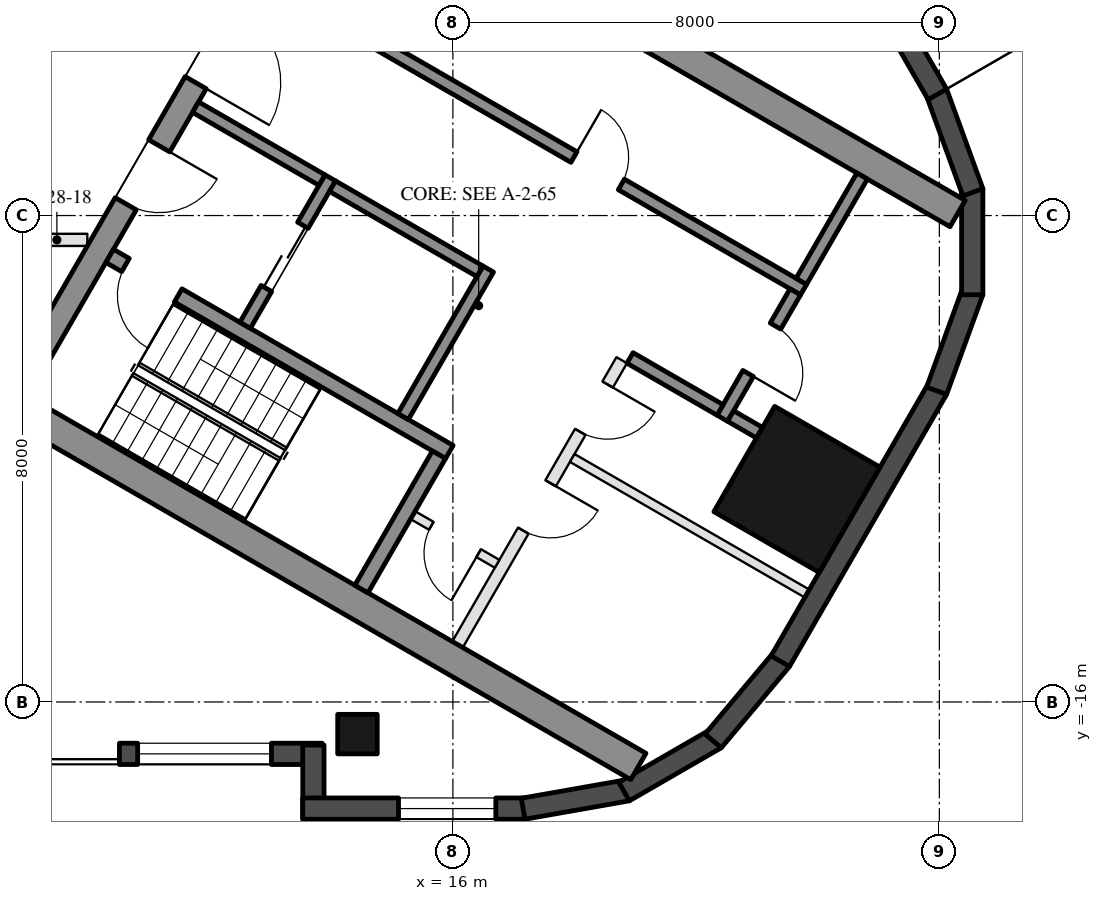
"""IFC4 building model, lengths in metres.
Left out: names, types, materials, properties, quantities, classifications, styles, units other than length and angle.
Written with IfcOpenShell. Run it as: python <this file> out.ifc"""

import sys

from ifc_helpers import new_model, si_unit, direction, frame, frame_2d, origin, origin_2d, place, context, subcontext, project, spatial, rectangle, hollow_rectangle, extrude, boolean, halfspace, element, fill, save


model = new_model("IFC4")
c1 = context("Model", 3, precision=1e-05, world=origin(), true_north=direction((0.0, 1.0)))
c2 = subcontext(c1, "Body", "Model", "MODEL_VIEW")
j1 = project(units=[si_unit("LENGTHUNIT", "METRE"), si_unit("PLANEANGLEUNIT", "RADIAN")], contexts=[c1])
p1 = place(None, origin())
s1 = spatial("IfcSite", under=j1, at=p1, CompositionType="ELEMENT")
p2 = place(p1, origin())
s2 = spatial("IfcBuilding", under=s1, at=p2, CompositionType="ELEMENT")
p3 = place(p2, frame((0.0, 0.0, 280.0)))
s3 = spatial("IfcBuildingStorey", under=s2, at=p3, CompositionType="ELEMENT", Elevation=280.0)
p4 = place(p3, frame((14.431, -16.529, 0.0), z_axis=(0.0, 0.0, 1.0), x_axis=(-1.0, 0.0, 0.0)))
e1 = element("IfcColumn", 1, at=p4, inside=s3, PredefinedType="COLUMN", context=c2, shape_type="SweptSolid", body=[
    boolean("DIFFERENCE", extrude(hollow_rectangle(XDim=0.65, YDim=0.65, WallThickness=0.03, at=origin_2d()), origin(), (0.0, 0.0, 1.0), 3.7), halfspace(frame((0.0, 0.0, 0.047), z_axis=(0.0, 0.0, 1.0), x_axis=(1.0, 0.0, 0.0)), True)),
])
p5 = place(p3, frame((21.658, -12.504, 0.0), z_axis=(0.0, 0.0, 1.0), x_axis=(0.5, 0.866025403784, 0.0)))
e2 = element("IfcColumn", 2, at=p5, inside=s3, PredefinedType="COLUMN", context=c2, shape_type="SweptSolid", body=[
    boolean("DIFFERENCE", extrude(hollow_rectangle(XDim=2.0, YDim=2.0, WallThickness=0.05, at=origin_2d()), origin(), (0.0, 0.0, 1.0), 3.7), halfspace(frame((0.0, 0.0, 0.113), z_axis=(0.0, 0.0, 1.0), x_axis=(1.0, 0.0, 0.0)), True)),
])
p6 = place(p3, frame((7.795, -16.854, 0.0), z_axis=(0.0, 0.0, 1.0), x_axis=(1.0, 0.0, 0.0)))
e3 = element("IfcWall", 3, at=p6, inside=s3, PredefinedType="SOLIDWALL", context=c2, shape_type="SweptSolid", body=[
    extrude(rectangle(XDim=6.055, YDim=0.35, at=frame_2d((3.028, 0.0))), origin(), (0.0, 0.0, 1.0), 3.55),
])
p7 = place(p6, frame((0.32, 0.0, 0.0)))
e4 = element("IfcOpeningElement", 4, at=p7, cuts=e3, PredefinedType="OPENING", context=c2, shape_type="SweptSolid", body=[
    extrude(rectangle(XDim=2.4, YDim=2.4, at=frame_2d((1.2, 1.2))), frame((0.0, 0.185, 0.0), z_axis=(0.0, -1.0, 0.0), x_axis=(1.0, 0.0, 0.0)), (0.0, 0.0, 1.0), 0.37),
])
p8 = place(p6, frame((3.02, 0.0, 0.3)))
e5 = element("IfcOpeningElement", 5, at=p8, cuts=e3, PredefinedType="OPENING", context=c2, shape_type="SweptSolid", body=[
    extrude(rectangle(XDim=2.2, YDim=2.65, at=frame_2d((1.1, 1.325))), frame((0.0, 0.185, 0.0), z_axis=(0.0, -1.0, 0.0), x_axis=(1.0, 0.0, 0.0)), (0.0, 0.0, 1.0), 0.37),
])
p9 = place(p3, frame((13.706, -16.709, 0.0), z_axis=(0.0, 0.0, 1.0), x_axis=(0.0, -1.0, 0.0)))
e6 = element("IfcWall", 6, at=p9, inside=s3, PredefinedType="SOLIDWALL", context=c2, shape_type="SweptSolid", body=[
    extrude(rectangle(XDim=1.22, YDim=0.35, at=frame_2d((0.61, 0.0))), origin(), (0.0, 0.0, 1.0), 3.55),
])
p10 = place(p3, frame((13.531, -17.754, 0.0), z_axis=(0.0, 0.0, 1.0), x_axis=(1.0, 0.0, 0.0)))
e7 = element("IfcWall", 7, at=p10, inside=s3, PredefinedType="SOLIDWALL", context=c2, shape_type="SweptSolid", body=[
    extrude(rectangle(XDim=3.654, YDim=0.35, at=frame_2d((1.827, 0.0))), origin(), (0.0, 0.0, 1.0), 3.55),
])
p11 = place(p10, frame((1.575, 0.0, 0.3)))
e8 = element("IfcOpeningElement", 8, at=p11, cuts=e7, PredefinedType="OPENING", context=c2, shape_type="SweptSolid", body=[
    extrude(rectangle(XDim=1.6, YDim=2.65, at=frame_2d((0.8, 1.325))), frame((0.0, 0.185, 0.0), z_axis=(0.0, -1.0, 0.0), x_axis=(1.0, 0.0, 0.0)), (0.0, 0.0, 1.0), 0.37),
])
for number, where, z_axis, x_axis in (
    (9, (17.155, -17.756, 0.0), (0.0, 0.0, 1.0), (0.985, 0.174, 0.0)),
    (10, (18.816, -17.474, 0.0), (0.0, 0.0, 1.0), (0.866, 0.5, 0.0)),
    (11, (20.28, -16.641, 0.0), (0.0, 0.0, 1.0), (0.643, 0.766, 0.0)),
):
    element("IfcWall", number, at=place(p3, frame(where, z_axis=z_axis, x_axis=x_axis)), inside=s3, PredefinedType="SOLIDWALL", context=c2, shape_type="SweptSolid", body=[
        extrude(rectangle(XDim=1.745, YDim=0.35, at=frame_2d((0.872, 0.0))), origin(), (0.0, 0.0, 1.0), 3.55),
    ])
p12 = place(p3, frame((21.384, -15.33, 0.0), z_axis=(0.0, 0.0, 1.0), x_axis=(0.500020983425, 0.866013288659, 0.0)))
e12 = element("IfcWall", 12, at=p12, inside=s3, PredefinedType="SOLIDWALL", context=c2, shape_type="SweptSolid", body=[
    extrude(rectangle(XDim=5.168, YDim=0.35, at=frame_2d((2.584, 0.0))), origin(), (0.0, 0.0, 1.0), 3.55),
])
for number, where, z_axis, x_axis in (
    (13, (23.955, -10.882, 0.0), (0.0, 0.0, 1.0), (0.342, 0.94, 0.0)),
    (14, (24.541, -9.302, 0.0), (0.0, 0.0, 1.0), (0.0, 1.0, 0.0)),
    (15, (24.552, -7.618, 0.0), (0.0, 0.0, 1.0), (-0.342, 0.94, 0.0)),
):
    element("IfcWall", number, at=place(p3, frame(where, z_axis=z_axis, x_axis=x_axis)), inside=s3, PredefinedType="SOLIDWALL", context=c2, shape_type="SweptSolid", body=[
        extrude(rectangle(XDim=1.745, YDim=0.35, at=frame_2d((0.872, 0.0))), origin(), (0.0, 0.0, 1.0), 3.55),
    ])
p13 = place(p3, frame((23.968, -6.006, 0.0), z_axis=(0.0, 0.0, 1.0), x_axis=(-0.500008899612, 0.86602026553, 0.0)))
e16 = element("IfcWall", 16, at=p13, inside=s3, PredefinedType="SOLIDWALL", context=c2, shape_type="SweptSolid", body=[
    extrude(rectangle(XDim=10.87, YDim=0.35, at=frame_2d((5.435, 0.0))), origin(), (0.0, 0.0, 1.0), 3.55),
])
p14 = place(p13, frame((6.894, 0.0, 0.0)))
e17 = element("IfcOpeningElement", 17, at=p14, cuts=e16, PredefinedType="OPENING", context=c2, shape_type="SweptSolid", body=[
    extrude(rectangle(XDim=2.4, YDim=2.4, at=frame_2d((1.2, 1.2))), frame((0.0, 0.185, 0.0), z_axis=(0.0, -1.0, 0.0), x_axis=(1.0, 0.0, 0.0)), (0.0, 0.0, 1.0), 0.37),
])
p15 = place(p13, frame((3.429, 0.0, 0.3)))
e18 = element("IfcOpeningElement", 18, at=p15, cuts=e16, PredefinedType="OPENING", context=c2, shape_type="SweptSolid", body=[
    extrude(rectangle(XDim=3.1, YDim=2.65, at=frame_2d((1.55, 1.325))), frame((0.0, 0.185, 0.0), z_axis=(0.0, -1.0, 0.0), x_axis=(1.0, 0.0, 0.0)), (0.0, 0.0, 1.0), 0.37),
])
for number, where, z_axis, x_axis in (
    (19, (8.547, -10.997, 0.0), (0.0, 0.0, 1.0), (0.866, -0.5, 0.0)),
    (20, (13.797, -1.903, 0.0), (0.0, 0.0, 1.0), (0.866, -0.5, 0.0)),
):
    element("IfcWall", number, at=place(p3, frame(where, z_axis=z_axis, x_axis=x_axis)), inside=s3, PredefinedType="SHEAR", context=c2, shape_type="SweptSolid", body=[
        extrude(rectangle(XDim=12.129, YDim=0.5, at=frame_2d((6.064, 0.0))), origin(), (0.0, 0.0, 1.0), 3.5),
    ])
p16 = place(p3, frame((8.845, -10.88, 0.0), z_axis=(0.0, 0.0, 1.0), x_axis=(0.500004234368, 0.866022959057, 0.0)))
e21 = element("IfcWall", 21, at=p16, inside=s3, PredefinedType="SHEAR", context=c2, shape_type="SweptSolid", body=[
    extrude(rectangle(XDim=10.0, YDim=0.4, at=frame_2d((5.0, 0.0))), origin(), (0.0, 0.0, 1.0), 3.5),
])
p17 = place(p16, frame((3.55, 0.0, 0.0)))
e22 = element("IfcOpeningElement", 22, at=p17, cuts=e21, PredefinedType="OPENING", context=c2, shape_type="SweptSolid", body=[
    extrude(rectangle(XDim=1.1, YDim=2.1, at=frame_2d((0.55, 1.05))), frame((0.0, 0.21, 0.0), z_axis=(0.0, -1.0, 0.0), x_axis=(1.0, 0.0, 0.0)), (0.0, 0.0, 1.0), 0.42),
])
p18 = place(p16, frame((5.85, 0.0, 0.0)))
e23 = element("IfcOpeningElement", 23, at=p18, cuts=e21, PredefinedType="OPENING", context=c2, shape_type="SweptSolid", body=[
    extrude(rectangle(XDim=1.4, YDim=2.1, at=frame_2d((0.7, 1.05))), frame((0.0, 0.21, 0.0), z_axis=(0.0, -1.0, 0.0), x_axis=(1.0, 0.0, 0.0)), (0.0, 0.0, 1.0), 0.42),
])
p19 = place(p3, frame((10.356, -8.664, 0.0), z_axis=(0.0, 0.0, 1.0), x_axis=(0.866028629588, -0.499994412703, 0.0)))
e24 = element("IfcWall", 24, at=p19, inside=s3, PredefinedType="SHEAR", context=c2, shape_type="SweptSolid", body=[
    extrude(rectangle(XDim=6.45, YDim=0.25, at=frame_2d((3.225, 0.0))), origin(), (0.0, 0.0, 1.0), 3.5),
])
p20 = place(p19, frame((0.3, 0.0, 0.0)))
e25 = element("IfcOpeningElement", 25, at=p20, cuts=e24, PredefinedType="OPENING", context=c2, shape_type="SweptSolid", body=[
    extrude(rectangle(XDim=1.0, YDim=2.1, at=frame_2d((0.5, 1.05))), frame((0.0, 0.135, 0.0), z_axis=(0.0, -1.0, 0.0), x_axis=(1.0, 0.0, 0.0)), (0.0, 0.0, 1.0), 0.27),
])
p21 = place(p3, frame((14.496, -14.143, 0.0), z_axis=(0.0, 0.0, 1.0), x_axis=(0.500062241894, 0.865989465428, 0.0)))
e26 = element("IfcWall", 26, at=p21, inside=s3, PredefinedType="SHEAR", context=c2, shape_type="SweptSolid", body=[
    extrude(rectangle(XDim=2.55, YDim=0.25, at=frame_2d((1.275, 0.0))), origin(), (0.0, 0.0, 1.0), 3.5),
])
p22 = place(p3, frame((15.181, -11.305, 0.0), z_axis=(0.0, 0.0, 1.0), x_axis=(0.49994636267, 0.866056369097, 0.0)))
e27 = element("IfcWall", 27, at=p22, inside=s3, PredefinedType="SHEAR", context=c2, shape_type="SweptSolid", body=[
    extrude(rectangle(XDim=2.8, YDim=0.2, at=frame_2d((1.4, 0.0))), origin(), (0.0, 0.0, 1.0), 3.5),
])
p23 = place(p3, frame((12.583, -9.805, 0.0), z_axis=(0.0, 0.0, 1.0), x_axis=(0.49994636267, 0.866056369097, 0.0)))
e28 = element("IfcWall", 28, at=p23, inside=s3, PredefinedType="SHEAR", context=c2, shape_type="SweptSolid", body=[
    extrude(rectangle(XDim=2.8, YDim=0.2, at=frame_2d((1.4, 0.0))), origin(), (0.0, 0.0, 1.0), 3.5),
])
p24 = place(p23, frame((0.7, 0.0, 0.0)))
e29 = element("IfcOpeningElement", 29, at=p24, cuts=e28, PredefinedType="OPENING", context=c2, shape_type="SweptSolid", body=[
    extrude(rectangle(XDim=1.2, YDim=2.1, at=frame_2d((0.6, 1.05))), frame((0.0, 0.11, 0.0), z_axis=(0.0, -1.0, 0.0), x_axis=(1.0, 0.0, 0.0)), (0.0, 0.0, 1.0), 0.22),
])
p25 = place(p3, frame((11.768, -6.217, 0.0), z_axis=(0.0, 0.0, 1.0), x_axis=(0.866050077142, -0.499957262057, 0.0)))
e30 = element("IfcWall", 30, at=p25, inside=s3, PredefinedType="SHEAR", context=c2, shape_type="SweptSolid", body=[
    extrude(rectangle(XDim=2.4, YDim=0.2, at=frame_2d((1.2, 0.0))), origin(), (0.0, 0.0, 1.0), 3.5),
])
p26 = place(p3, frame((14.02, -7.517, 0.0), z_axis=(0.0, 0.0, 1.0), x_axis=(0.866034573852, -0.49998411664, 0.0)))
e31 = element("IfcWall", 31, at=p26, inside=s3, PredefinedType="SHEAR", context=c2, shape_type="SweptSolid", body=[
    extrude(rectangle(XDim=2.8, YDim=0.2, at=frame_2d((1.4, 0.0))), origin(), (0.0, 0.0, 1.0), 3.5),
])
p27 = place(p3, frame((12.968, -4.138, 0.0), z_axis=(0.0, 0.0, 1.0), x_axis=(0.866028328073, -0.49999493495, 0.0)))
e32 = element("IfcWall", 32, at=p27, inside=s3, PredefinedType="SHEAR", context=c2, shape_type="SweptSolid", body=[
    extrude(rectangle(XDim=10.16, YDim=0.2, at=frame_2d((5.08, 0.0))), origin(), (0.0, 0.0, 1.0), 3.5),
])
p28 = place(p27, frame((0.62, 0.0, 0.0)))
e33 = element("IfcOpeningElement", 33, at=p28, cuts=e32, PredefinedType="OPENING", context=c2, shape_type="SweptSolid", body=[
    extrude(rectangle(XDim=1.1, YDim=2.1, at=frame_2d((0.55, 1.05))), frame((0.0, 0.11, 0.0), z_axis=(0.0, -1.0, 0.0), x_axis=(1.0, 0.0, 0.0)), (0.0, 0.0, 1.0), 0.22),
])
p29 = place(p27, frame((5.8, 0.0, 0.0)))
e34 = element("IfcOpeningElement", 34, at=p29, cuts=e32, PredefinedType="OPENING", context=c2, shape_type="SweptSolid", body=[
    extrude(rectangle(XDim=0.9, YDim=2.1, at=frame_2d((0.45, 1.05))), frame((0.0, 0.11, 0.0), z_axis=(0.0, -1.0, 0.0), x_axis=(1.0, 0.0, 0.0)), (0.0, 0.0, 1.0), 0.22),
])
p30 = place(p3, frame((20.43, -11.333, 0.0), z_axis=(0.0, 0.0, 1.0), x_axis=(0.500001309137, 0.866024647952, 0.0)))
e35 = element("IfcWall", 35, at=p30, inside=s3, PredefinedType="SHEAR", context=c2, shape_type="SweptSolid", body=[
    extrude(rectangle(XDim=2.4, YDim=0.2, at=frame_2d((1.2, 0.0))), origin(), (0.0, 0.0, 1.0), 3.5),
])
p31 = place(p30, frame((0.85, 0.0, 0.0)))
e36 = element("IfcOpeningElement", 36, at=p31, cuts=e35, PredefinedType="OPENING", context=c2, shape_type="SweptSolid", body=[
    extrude(rectangle(XDim=0.9, YDim=2.1, at=frame_2d((0.45, 1.05))), frame((0.0, 0.11, 0.0), z_axis=(0.0, -1.0, 0.0), x_axis=(1.0, 0.0, 0.0)), (0.0, 0.0, 1.0), 0.22),
])
p32 = place(p3, frame((18.913, -10.342, 0.0), z_axis=(0.0, 0.0, 1.0), x_axis=(0.866038183914, -0.499977863513, 0.0)))
e37 = element("IfcWall", 37, at=p32, inside=s3, PredefinedType="SHEAR", context=c2, shape_type="SweptSolid", body=[
    extrude(rectangle(XDim=1.71, YDim=0.2, at=frame_2d((0.855, 0.0))), origin(), (0.0, 0.0, 1.0), 3.5),
])
for number, where, z_axis, x_axis in (
    (38, (15.131, -5.272, 0.0), (0.0, 0.0, 1.0), (0.5, 0.866, 0.0)),
    (39, (21.73, -9.082, 0.0), (0.0, 0.0, 1.0), (0.5, 0.866, 0.0)),
):
    element("IfcWall", number, at=place(p3, frame(where, z_axis=z_axis, x_axis=x_axis)), inside=s3, PredefinedType="SHEAR", context=c2, shape_type="SweptSolid", body=[
        extrude(rectangle(XDim=2.0, YDim=0.2, at=frame_2d((1.0, 0.0))), origin(), (0.0, 0.0, 1.0), 3.5),
    ])
p33 = place(p3, frame((20.567, -11.297, 0.0), z_axis=(0.0, 0.0, 1.0), x_axis=(0.866237429803, -0.49963258021, 0.0)))
e40 = element("IfcWall", 40, at=p33, inside=s3, PredefinedType="SHEAR", context=c2, shape_type="SweptSolid", body=[
    extrude(rectangle(XDim=0.549, YDim=0.2, at=frame_2d((0.274, 0.0))), origin(), (0.0, 0.0, 1.0), 3.5),
])
p34 = place(p3, frame((16.076, -15.055, 0.0), z_axis=(0.0, 0.0, 1.0), x_axis=(0.499995103361, 0.866028230842, 0.0)))
e41 = element("IfcWall", 41, at=p34, inside=s3, PredefinedType="PARTITIONING", context=c2, shape_type="SweptSolid", body=[
    extrude(rectangle(XDim=5.4, YDim=0.2, at=frame_2d((2.7, 0.0))), origin(), (0.0, 0.0, 1.0), 3.5),
])
p35 = place(p34, frame((2.163, 0.0, 0.0)))
e42 = element("IfcOpeningElement", 42, at=p35, cuts=e41, PredefinedType="OPENING", context=c2, shape_type="SweptSolid", body=[
    extrude(rectangle(XDim=0.9, YDim=2.1, at=frame_2d((0.45, 1.05))), frame((0.0, 0.11, 0.0), z_axis=(0.0, -1.0, 0.0), x_axis=(1.0, 0.0, 0.0)), (0.0, 0.0, 1.0), 0.22),
])
p36 = place(p34, frame((4.038, 0.0, 0.0)))
e43 = element("IfcOpeningElement", 43, at=p36, cuts=e41, PredefinedType="OPENING", context=c2, shape_type="SweptSolid", body=[
    extrude(rectangle(XDim=0.9, YDim=2.1, at=frame_2d((0.45, 1.05))), frame((0.0, 0.11, 0.0), z_axis=(0.0, -1.0, 0.0), x_axis=(1.0, 0.0, 0.0)), (0.0, 0.0, 1.0), 0.22),
])
p37 = place(p3, frame((15.342, -12.928, 0.0), z_axis=(0.0, 0.0, 1.0), x_axis=(0.865989903783, -0.500061482766, 0.0)))
e44 = element("IfcWall", 44, at=p37, inside=s3, PredefinedType="PARTITIONING", context=c2, shape_type="SweptSolid", body=[
    extrude(rectangle(XDim=1.6, YDim=0.15, at=frame_2d((0.8, 0.0))), origin(), (0.0, 0.0, 1.0), 3.5),
])
p38 = place(p37, frame((0.35, 0.0, 0.0)))
e45 = element("IfcOpeningElement", 45, at=p38, cuts=e44, PredefinedType="OPENING", context=c2, shape_type="SweptSolid", body=[
    extrude(rectangle(XDim=0.9, YDim=2.1, at=frame_2d((0.45, 1.05))), frame((0.0, 0.085, 0.0), z_axis=(0.0, -1.0, 0.0), x_axis=(1.0, 0.0, 0.0)), (0.0, 0.0, 1.0), 0.17),
])
p39 = place(p3, frame((17.963, -11.987, 0.0), z_axis=(0.0, 0.0, 1.0), x_axis=(0.866010510293, -0.500025795397, 0.0)))
e46 = element("IfcWall", 46, at=p39, inside=s3, PredefinedType="PARTITIONING", context=c2, shape_type="SweptSolid", body=[
    extrude(rectangle(XDim=4.459, YDim=0.15, at=frame_2d((2.229, 0.0))), origin(), (0.0, 0.0, 1.0), 3.5),
])
p40 = place(p3, frame((9.988, -8.4, 0.0), z_axis=(0.0, 0.0, 1.0), x_axis=(-1.0, 0.0, 0.0)))
e47 = element("IfcWall", 47, at=p40, inside=s3, PredefinedType="PARTITIONING", context=c2, shape_type="SweptSolid", body=[
    extrude(rectangle(XDim=4.175, YDim=0.2, at=frame_2d((2.087, 0.0))), origin(), (0.0, 0.0, 1.0), 3.05),
])
p41 = place(p40, frame((1.587, 0.0, 0.0)))
e48 = element("IfcOpeningElement", 48, at=p41, cuts=e47, PredefinedType="OPENING", context=c2, shape_type="SweptSolid", body=[
    extrude(rectangle(XDim=1.0, YDim=2.1, at=frame_2d((0.5, 1.05))), frame((0.0, 0.11, 0.0), z_axis=(0.0, -1.0, 0.0), x_axis=(1.0, 0.0, 0.0)), (0.0, 0.0, 1.0), 0.22),
])
p42 = place(p7, frame((2.4, 0.0, 0.0), z_axis=(0.0, 0.0, 1.0), x_axis=(-1.0, 0.0, 0.0)))
e49 = element("IfcDoor", 49, at=p42, inside=s3, OperationType="SLIDING_TO_LEFT", PredefinedType="DOOR", context=c2, shape_type="SweptSolid", body=[
    extrude(rectangle(XDim=2.4, YDim=2.4, at=frame_2d((1.2, 1.2))), frame((0.0, 0.025, 0.0), z_axis=(0.0, -1.0, 0.0), x_axis=(1.0, 0.0, 0.0)), (0.0, 0.0, 1.0), 0.05),
])
fill(e4, e49)
p43 = place(p8, origin())
e50 = element("IfcWindow", 50, at=p43, inside=s3, PartitioningType="SINGLE_PANEL", PredefinedType="WINDOW", context=c2, shape_type="SweptSolid", body=[
    extrude(rectangle(XDim=2.2, YDim=2.65, at=frame_2d((1.1, 1.325))), frame((0.0, 0.03, 0.0), z_axis=(0.0, -1.0, 0.0), x_axis=(1.0, 0.0, 0.0)), (0.0, 0.0, 1.0), 0.06),
])
fill(e5, e50)
p44 = place(p11, origin())
e51 = element("IfcWindow", 51, at=p44, inside=s3, PartitioningType="SINGLE_PANEL", PredefinedType="WINDOW", context=c2, shape_type="SweptSolid", body=[
    extrude(rectangle(XDim=1.6, YDim=2.65, at=frame_2d((0.8, 1.325))), frame((0.0, 0.03, 0.0), z_axis=(0.0, -1.0, 0.0), x_axis=(1.0, 0.0, 0.0)), (0.0, 0.0, 1.0), 0.06),
])
fill(e8, e51)
p45 = place(p24, origin())
e52 = element("IfcDoor", 52, at=p45, inside=s3, OperationType="DOUBLE_DOOR_SLIDING", PredefinedType="DOOR", context=c2, shape_type="SweptSolid", body=[
    extrude(rectangle(XDim=1.2, YDim=2.1, at=frame_2d((0.6, 1.05))), frame((0.0, 0.025, 0.0), z_axis=(0.0, -1.0, 0.0), x_axis=(1.0, 0.0, 0.0)), (0.0, 0.0, 1.0), 0.05),
])
fill(e29, e52)
p46 = place(p38, frame((0.9, 0.0, 0.0), z_axis=(0.0, 0.0, 1.0), x_axis=(-1.0, 0.0, 0.0)))
e53 = element("IfcDoor", 53, at=p46, inside=s3, OperationType="SINGLE_SWING_LEFT", PredefinedType="DOOR", context=c2, shape_type="SweptSolid", body=[
    extrude(rectangle(XDim=0.9, YDim=2.1, at=frame_2d((0.45, 1.05))), frame((0.0, 0.025, 0.0), z_axis=(0.0, -1.0, 0.0), x_axis=(1.0, 0.0, 0.0)), (0.0, 0.0, 1.0), 0.05),
])
fill(e45, e53)
p47 = place(p29, origin())
e54 = element("IfcDoor", 54, at=p47, inside=s3, OperationType="SINGLE_SWING_LEFT", PredefinedType="DOOR", context=c2, shape_type="SweptSolid", body=[
    extrude(rectangle(XDim=0.9, YDim=2.1, at=frame_2d((0.45, 1.05))), frame((0.0, 0.025, 0.0), z_axis=(0.0, -1.0, 0.0), x_axis=(1.0, 0.0, 0.0)), (0.0, 0.0, 1.0), 0.05),
])
fill(e34, e54)
p48 = place(p31, frame((0.9, 0.0, 0.0), z_axis=(0.0, 0.0, 1.0), x_axis=(-1.0, 0.0, 0.0)))
e55 = element("IfcDoor", 55, at=p48, inside=s3, OperationType="SINGLE_SWING_RIGHT", PredefinedType="DOOR", context=c2, shape_type="SweptSolid", body=[
    extrude(rectangle(XDim=0.9, YDim=2.1, at=frame_2d((0.45, 1.05))), frame((0.0, 0.025, 0.0), z_axis=(0.0, -1.0, 0.0), x_axis=(1.0, 0.0, 0.0)), (0.0, 0.0, 1.0), 0.05),
])
fill(e36, e55)
p49 = place(p35, frame((0.9, 0.0, 0.0), z_axis=(0.0, 0.0, 1.0), x_axis=(-1.0, 0.0, 0.0)))
e56 = element("IfcDoor", 56, at=p49, inside=s3, OperationType="SINGLE_SWING_LEFT", PredefinedType="DOOR", context=c2, shape_type="SweptSolid", body=[
    extrude(rectangle(XDim=0.9, YDim=2.1, at=frame_2d((0.45, 1.05))), frame((0.0, 0.025, 0.0), z_axis=(0.0, -1.0, 0.0), x_axis=(1.0, 0.0, 0.0)), (0.0, 0.0, 1.0), 0.05),
])
fill(e42, e56)
p50 = place(p36, frame((0.9, 0.0, 0.0), z_axis=(0.0, 0.0, 1.0), x_axis=(-1.0, 0.0, 0.0)))
e57 = element("IfcDoor", 57, at=p50, inside=s3, OperationType="SINGLE_SWING_LEFT", PredefinedType="DOOR", context=c2, shape_type="SweptSolid", body=[
    extrude(rectangle(XDim=0.9, YDim=2.1, at=frame_2d((0.45, 1.05))), frame((0.0, 0.025, 0.0), z_axis=(0.0, -1.0, 0.0), x_axis=(1.0, 0.0, 0.0)), (0.0, 0.0, 1.0), 0.05),
])
fill(e43, e57)
p51 = place(p17, frame((1.1, 0.0, 0.0), z_axis=(0.0, 0.0, 1.0), x_axis=(-1.0, 0.0, 0.0)))
e58 = element("IfcDoor", 58, at=p51, inside=s3, OperationType="SINGLE_SWING_LEFT", PredefinedType="DOOR", context=c2, shape_type="SweptSolid", body=[
    extrude(rectangle(XDim=1.1, YDim=2.1, at=frame_2d((0.55, 1.05))), frame((0.0, 0.025, 0.0), z_axis=(0.0, -1.0, 0.0), x_axis=(1.0, 0.0, 0.0)), (0.0, 0.0, 1.0), 0.05),
])
fill(e22, e58)
p52 = place(p18, frame((1.4, 0.0, 0.0), z_axis=(0.0, 0.0, 1.0), x_axis=(-1.0, 0.0, 0.0)))
e59 = element("IfcDoor", 59, at=p52, inside=s3, OperationType="DOUBLE_DOOR_SINGLE_SWING", PredefinedType="DOOR", context=c2, shape_type="SweptSolid", body=[
    extrude(rectangle(XDim=1.4, YDim=2.1, at=frame_2d((0.7, 1.05))), frame((0.0, 0.025, 0.0), z_axis=(0.0, -1.0, 0.0), x_axis=(1.0, 0.0, 0.0)), (0.0, 0.0, 1.0), 0.05),
])
fill(e23, e59)
p53 = place(p20, frame((1.0, 0.0, 0.0), z_axis=(0.0, 0.0, 1.0), x_axis=(-1.0, 0.0, 0.0)))
e60 = element("IfcDoor", 60, at=p53, inside=s3, OperationType="SINGLE_SWING_LEFT", PredefinedType="DOOR", context=c2, shape_type="SweptSolid", body=[
    extrude(rectangle(XDim=1.0, YDim=2.1, at=frame_2d((0.5, 1.05))), frame((0.0, 0.025, 0.0), z_axis=(0.0, -1.0, 0.0), x_axis=(1.0, 0.0, 0.0)), (0.0, 0.0, 1.0), 0.05),
])
fill(e25, e60)
save(model, sys.argv[1])
